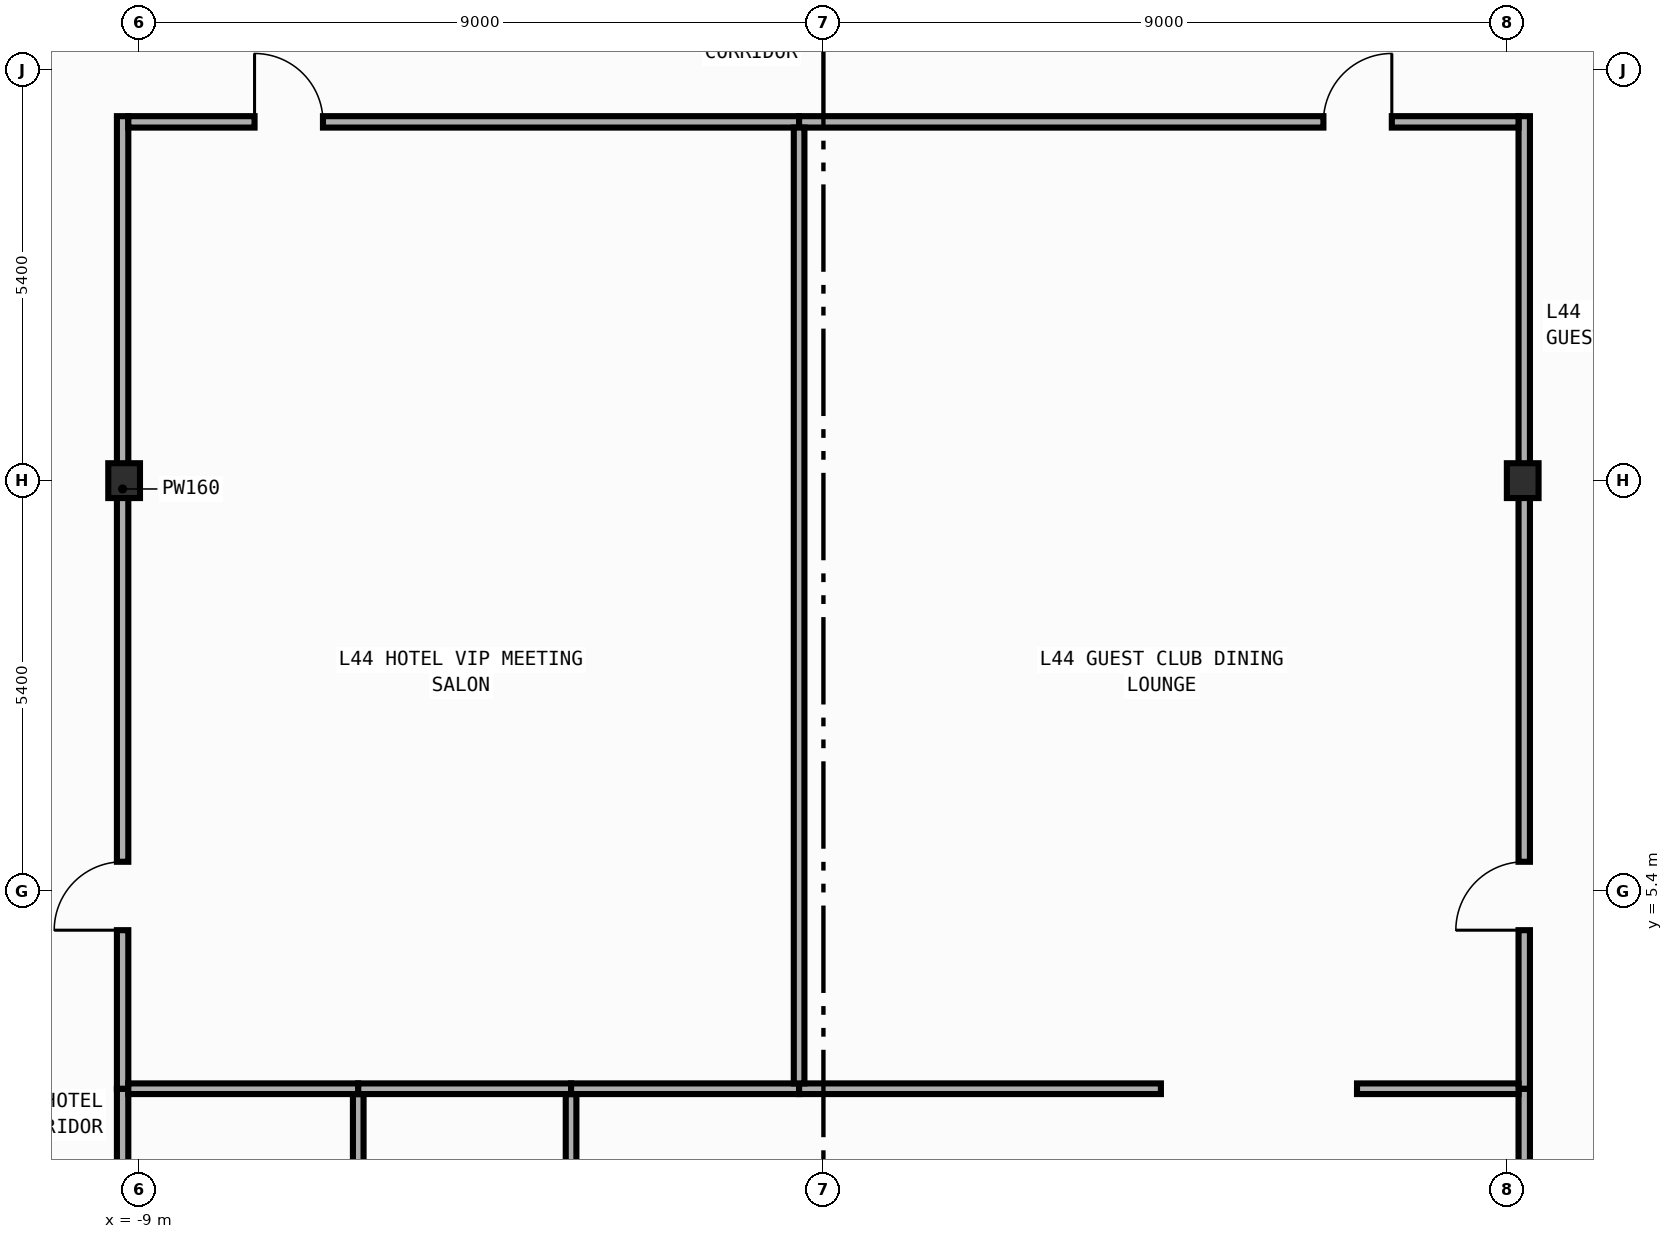
"""IFC4 building model, lengths in metres.
Left out: names, types, materials, properties, quantities, classifications, styles, units other than length and angle.
Written with IfcOpenShell. Run it as: python <this file> out.ifc"""

import sys

from ifc_helpers import new_model, si_unit, direction, frame, frame_2d, origin, origin_2d, place, context, subcontext, project, spatial, rectangle, i_section, extrude, element, fill, save


model = new_model("IFC4")
c1 = context("Model", 3, precision=1e-05, world=origin(), true_north=direction((0.0, 1.0)))
c2 = subcontext(c1, "Body", "Model", "MODEL_VIEW")
j1 = project(units=[si_unit("LENGTHUNIT", "METRE"), si_unit("PLANEANGLEUNIT", "RADIAN")], contexts=[c1])
p1 = place(None, origin())
s1 = spatial("IfcSite", under=j1, at=p1, CompositionType="ELEMENT")
p2 = place(p1, origin())
s2 = spatial("IfcBuilding", under=s1, at=p2, CompositionType="ELEMENT")
p3 = place(p2, frame((0.0, 0.0, 191.6)))
s3 = spatial("IfcBuildingStorey", under=s2, at=p3, CompositionType="ELEMENT", Elevation=191.6)
for number, where, z_axis, x_axis in (
    (1, (-9.2, 10.8, 0.0), (0.0, 0.0, 1.0), (1.0, 0.0, 0.0)),
    (2, (9.2, 10.8, 0.0), (0.0, 0.0, 1.0), (1.0, 0.0, 0.0)),
):
    element("IfcColumn", number, at=place(p3, frame(where, z_axis=z_axis, x_axis=x_axis)), inside=s3, PredefinedType="COLUMN", context=c2, shape_type="SweptSolid", body=[
        extrude(i_section(OverallWidth=0.417, OverallDepth=0.458, WebThickness=0.03, FlangeThickness=0.05, FilletRadius=0.022, at=origin_2d()), origin(), (0.0, 0.0, 1.0), 3.8),
    ])
p4 = place(p3, frame((-9.22, -13.795, 0.0), z_axis=(0.0, 0.0, 1.0), x_axis=(0.0, 1.0, 0.0)))
e3 = element("IfcWall", 3, at=p4, inside=s3, PredefinedType="PARTITIONING", context=c2, shape_type="SweptSolid", body=[
    extrude(rectangle(XDim=16.595, YDim=0.15, at=frame_2d((8.297, 0.0))), origin(), (0.0, 0.0, 1.0), 2.952),
])
p5 = place(p4, frame((7.949, 0.0, 0.0)))
e4 = element("IfcOpeningElement", 4, at=p5, cuts=e3, PredefinedType="OPENING", context=c2, shape_type="SweptSolid", body=[
    extrude(rectangle(XDim=0.9, YDim=2.15, at=frame_2d((0.45, 1.075))), frame((0.0, 0.085, 0.0), z_axis=(0.0, -1.0, 0.0), x_axis=(1.0, 0.0, 0.0)), (0.0, 0.0, 1.0), 0.17),
])
p6 = place(p3, frame((-9.22, 2.8, 0.0), z_axis=(0.0, 0.0, 1.0), x_axis=(0.0, 1.0, 0.0)))
e5 = element("IfcWall", 5, at=p6, inside=s3, PredefinedType="PARTITIONING", context=c2, shape_type="SweptSolid", body=[
    extrude(rectangle(XDim=12.795, YDim=0.15, at=frame_2d((6.397, 0.0))), origin(), (0.0, 0.0, 1.0), 2.952),
])
p7 = place(p6, frame((2.086, 0.0, 0.0)))
e6 = element("IfcOpeningElement", 6, at=p7, cuts=e5, PredefinedType="OPENING", context=c2, shape_type="SweptSolid", body=[
    extrude(rectangle(XDim=0.9, YDim=2.15, at=frame_2d((0.45, 1.075))), frame((0.0, 0.085, 0.0), z_axis=(0.0, -1.0, 0.0), x_axis=(1.0, 0.0, 0.0)), (0.0, 0.0, 1.0), 0.17),
])
p8 = place(p3, frame((9.22, -13.795, 0.0), z_axis=(0.0, 0.0, 1.0), x_axis=(0.0, 1.0, 0.0)))
e7 = element("IfcWall", 7, at=p8, inside=s3, PredefinedType="PARTITIONING", context=c2, shape_type="SweptSolid", body=[
    extrude(rectangle(XDim=16.595, YDim=0.15, at=frame_2d((8.297, 0.0))), origin(), (0.0, 0.0, 1.0), 2.952),
])
p9 = place(p8, frame((7.949, 0.0, 0.0)))
e8 = element("IfcOpeningElement", 8, at=p9, cuts=e7, PredefinedType="OPENING", context=c2, shape_type="SweptSolid", body=[
    extrude(rectangle(XDim=0.9, YDim=2.15, at=frame_2d((0.45, 1.075))), frame((0.0, 0.085, 0.0), z_axis=(0.0, -1.0, 0.0), x_axis=(1.0, 0.0, 0.0)), (0.0, 0.0, 1.0), 0.17),
])
p10 = place(p3, frame((9.22, 2.8, 0.0), z_axis=(0.0, 0.0, 1.0), x_axis=(0.0, 1.0, 0.0)))
e9 = element("IfcWall", 9, at=p10, inside=s3, PredefinedType="PARTITIONING", context=c2, shape_type="SweptSolid", body=[
    extrude(rectangle(XDim=12.795, YDim=0.15, at=frame_2d((6.397, 0.0))), origin(), (0.0, 0.0, 1.0), 2.952),
])
p11 = place(p10, frame((2.086, 0.0, 0.0)))
e10 = element("IfcOpeningElement", 10, at=p11, cuts=e9, PredefinedType="OPENING", context=c2, shape_type="SweptSolid", body=[
    extrude(rectangle(XDim=0.9, YDim=2.15, at=frame_2d((0.45, 1.075))), frame((0.0, 0.085, 0.0), z_axis=(0.0, -1.0, 0.0), x_axis=(1.0, 0.0, 0.0)), (0.0, 0.0, 1.0), 0.17),
])
p12 = place(p3, frame((-9.145, 15.52, 0.0), z_axis=(0.0, 0.0, 1.0), x_axis=(1.0, 0.0, 0.0)))
e11 = element("IfcWall", 11, at=p12, inside=s3, PredefinedType="PARTITIONING", context=c2, shape_type="SweptSolid", body=[
    extrude(rectangle(XDim=8.825, YDim=0.15, at=frame_2d((4.413, 0.0))), origin(), (0.0, 0.0, 1.0), 3.54),
])
p13 = place(p12, frame((1.661, 0.0, 0.0)))
e12 = element("IfcOpeningElement", 12, at=p13, cuts=e11, PredefinedType="OPENING", context=c2, shape_type="SweptSolid", body=[
    extrude(rectangle(XDim=0.9, YDim=2.15, at=frame_2d((0.45, 1.075))), frame((0.0, 0.085, 0.0), z_axis=(0.0, -1.0, 0.0), x_axis=(1.0, 0.0, 0.0)), (0.0, 0.0, 1.0), 0.17),
])
p14 = place(p3, frame((-0.32, 15.52, 0.0), z_axis=(0.0, 0.0, 1.0), x_axis=(1.0, 0.0, 0.0)))
e13 = element("IfcWall", 13, at=p14, inside=s3, PredefinedType="PARTITIONING", context=c2, shape_type="SweptSolid", body=[
    extrude(rectangle(XDim=9.465, YDim=0.15, at=frame_2d((4.732, 0.0))), origin(), (0.0, 0.0, 1.0), 3.54),
])
p15 = place(p14, frame((6.898, 0.0, 0.0)))
e14 = element("IfcOpeningElement", 14, at=p15, cuts=e13, PredefinedType="OPENING", context=c2, shape_type="SweptSolid", body=[
    extrude(rectangle(XDim=0.9, YDim=2.15, at=frame_2d((0.45, 1.075))), frame((0.0, 0.085, 0.0), z_axis=(0.0, -1.0, 0.0), x_axis=(1.0, 0.0, 0.0)), (0.0, 0.0, 1.0), 0.17),
])
p16 = place(p3, frame((-6.12, -13.645, 0.0), z_axis=(0.0, 0.0, 1.0), x_axis=(0.0, 1.0, 0.0)))
e15 = element("IfcWall", 15, at=p16, inside=s3, PredefinedType="PARTITIONING", context=c2, shape_type="SweptSolid", body=[
    extrude(rectangle(XDim=16.375, YDim=0.14, at=frame_2d((8.188, 0.0))), origin(), (0.0, 0.0, 1.0), 3.54),
])
p17 = place(p3, frame((-9.145, 2.8, 0.0), z_axis=(0.0, 0.0, 1.0), x_axis=(1.0, 0.0, 0.0)))
e16 = element("IfcWall", 16, at=p17, inside=s3, PredefinedType="PARTITIONING", context=c2, shape_type="SweptSolid", body=[
    extrude(rectangle(XDim=3.025, YDim=0.14, at=frame_2d((1.512, 0.0))), origin(), (0.0, 0.0, 1.0), 3.54),
])
p18 = place(p3, frame((-3.32, -13.645, 0.0), z_axis=(0.0, 0.0, 1.0), x_axis=(0.0, 1.0, 0.0)))
e17 = element("IfcWall", 17, at=p18, inside=s3, PredefinedType="PARTITIONING", context=c2, shape_type="SweptSolid", body=[
    extrude(rectangle(XDim=16.375, YDim=0.14, at=frame_2d((8.188, 0.0))), origin(), (0.0, 0.0, 1.0), 3.54),
])
p19 = place(p3, frame((-6.12, 2.8, 0.0), z_axis=(0.0, 0.0, 1.0), x_axis=(1.0, 0.0, 0.0)))
e18 = element("IfcWall", 18, at=p19, inside=s3, PredefinedType="PARTITIONING", context=c2, shape_type="SweptSolid", body=[
    extrude(rectangle(XDim=2.8, YDim=0.14, at=frame_2d((1.4, 0.0))), origin(), (0.0, 0.0, 1.0), 3.54),
])
p20 = place(p3, frame((-3.32, 2.8, 0.0), z_axis=(0.0, 0.0, 1.0), x_axis=(1.0, 0.0, 0.0)))
e19 = element("IfcWall", 19, at=p20, inside=s3, PredefinedType="PARTITIONING", context=c2, shape_type="SweptSolid", body=[
    extrude(rectangle(XDim=3.0, YDim=0.14, at=frame_2d((1.5, 0.0))), origin(), (0.0, 0.0, 1.0), 3.54),
])
p21 = place(p3, frame((-0.32, 2.8, 0.0), z_axis=(0.0, 0.0, 1.0), x_axis=(1.0, 0.0, 0.0)))
e20 = element("IfcWall", 20, at=p21, inside=s3, PredefinedType="PARTITIONING", context=c2, shape_type="SweptSolid", body=[
    extrude(rectangle(XDim=4.76, YDim=0.14, at=frame_2d((2.38, 0.0))), origin(), (0.0, 0.0, 1.0), 3.54),
])
p22 = place(p3, frame((7.02, 2.8, 0.0), z_axis=(0.0, 0.0, 1.0), x_axis=(1.0, 0.0, 0.0)))
e21 = element("IfcWall", 21, at=p22, inside=s3, PredefinedType="PARTITIONING", context=c2, shape_type="SweptSolid", body=[
    extrude(rectangle(XDim=2.125, YDim=0.14, at=frame_2d((1.062, 0.0))), origin(), (0.0, 0.0, 1.0), 3.54),
])
p23 = place(p3, frame((-0.32, 2.87, 0.0), z_axis=(0.0, 0.0, 1.0), x_axis=(0.0, 1.0, 0.0)))
e22 = element("IfcWall", 22, at=p23, inside=s3, PredefinedType="PARTITIONING", context=c2, shape_type="SweptSolid", body=[
    extrude(rectangle(XDim=12.575, YDim=0.14, at=frame_2d((6.288, 0.0))), origin(), (0.0, 0.0, 1.0), 3.54),
])
p24 = place(p7, origin())
e23 = element("IfcDoor", 23, at=p24, inside=s3, OperationType="SINGLE_SWING_LEFT", PredefinedType="DOOR", context=c2, shape_type="SweptSolid", body=[
    extrude(rectangle(XDim=0.9, YDim=2.15, at=frame_2d((0.45, 1.075))), frame((0.0, 0.025, 0.0), z_axis=(0.0, -1.0, 0.0), x_axis=(1.0, 0.0, 0.0)), (0.0, 0.0, 1.0), 0.05),
])
fill(e6, e23)
p25 = place(p11, origin())
e24 = element("IfcDoor", 24, at=p25, inside=s3, OperationType="SINGLE_SWING_LEFT", PredefinedType="DOOR", context=c2, shape_type="SweptSolid", body=[
    extrude(rectangle(XDim=0.9, YDim=2.15, at=frame_2d((0.45, 1.075))), frame((0.0, 0.025, 0.0), z_axis=(0.0, -1.0, 0.0), x_axis=(1.0, 0.0, 0.0)), (0.0, 0.0, 1.0), 0.05),
])
fill(e10, e24)
p26 = place(p13, origin())
e25 = element("IfcDoor", 25, at=p26, inside=s3, OperationType="SINGLE_SWING_LEFT", PredefinedType="DOOR", context=c2, shape_type="SweptSolid", body=[
    extrude(rectangle(XDim=0.9, YDim=2.15, at=frame_2d((0.45, 1.075))), frame((0.0, 0.025, 0.0), z_axis=(0.0, -1.0, 0.0), x_axis=(1.0, 0.0, 0.0)), (0.0, 0.0, 1.0), 0.05),
])
fill(e12, e25)
p27 = place(p15, origin())
e26 = element("IfcDoor", 26, at=p27, inside=s3, OperationType="SINGLE_SWING_RIGHT", PredefinedType="DOOR", context=c2, shape_type="SweptSolid", body=[
    extrude(rectangle(XDim=0.9, YDim=2.15, at=frame_2d((0.45, 1.075))), frame((0.0, 0.025, 0.0), z_axis=(0.0, -1.0, 0.0), x_axis=(1.0, 0.0, 0.0)), (0.0, 0.0, 1.0), 0.05),
])
fill(e14, e26)
save(model, sys.argv[1])
